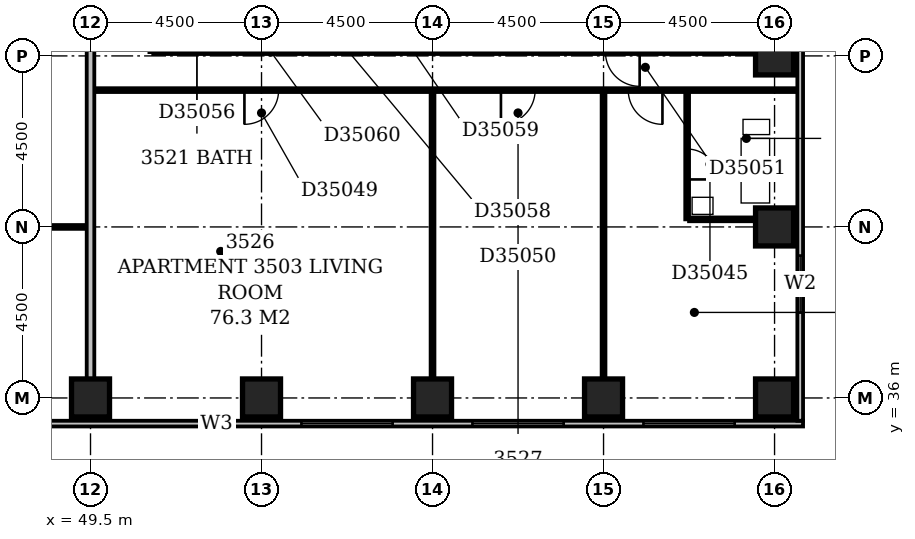
"""IFC4 building model, lengths in metres.
Left out: names, types, materials, properties, quantities, classifications, styles, units other than length and angle.
Written with IfcOpenShell. Run it as: python <this file> out.ifc"""

import sys

from ifc_helpers import new_model, si_unit, direction, frame, frame_2d, origin, origin_2d, place, context, subcontext, project, spatial, rectangle, extrude, element, fill, save


model = new_model("IFC4")
c1 = context("Model", 3, precision=1e-05, world=origin(), true_north=direction((0.0, 1.0)))
c2 = subcontext(c1, "Body", "Model", "MODEL_VIEW")
j1 = project(units=[si_unit("LENGTHUNIT", "METRE"), si_unit("PLANEANGLEUNIT", "RADIAN")], contexts=[c1])
p1 = place(None, origin())
s1 = spatial("IfcSite", under=j1, at=p1, CompositionType="ELEMENT")
p2 = place(p1, origin())
s2 = spatial("IfcBuilding", under=s1, at=p2, CompositionType="ELEMENT")
p3 = place(p2, frame((0.0, 0.0, 141.2)))
s3 = spatial("IfcBuildingStorey", under=s2, at=p3, CompositionType="ELEMENT", Elevation=141.2)
for number, where, z_axis, x_axis in (
    (1, (49.5, 36.0, -0.3), (0.0, 0.0, 1.0), (1.0, 0.0, 0.0)),
    (2, (54.0, 36.0, -0.3), (0.0, 0.0, 1.0), (1.0, 0.0, 0.0)),
    (3, (58.5, 36.0, -0.3), (0.0, 0.0, 1.0), (1.0, 0.0, 0.0)),
    (4, (63.0, 36.0, -0.3), (0.0, 0.0, 1.0), (1.0, 0.0, 0.0)),
    (5, (67.5, 36.0, -0.3), (0.0, 0.0, 1.0), (1.0, 0.0, 0.0)),
    (6, (67.5, 40.5, -0.3), (0.0, 0.0, 1.0), (1.0, 0.0, 0.0)),
    (7, (67.5, 45.0, -0.3), (0.0, 0.0, 1.0), (1.0, 0.0, 0.0)),
):
    element("IfcColumn", number, at=place(p3, frame(where, z_axis=z_axis, x_axis=x_axis)), inside=s3, PredefinedType="COLUMN", context=c2, shape_type="SweptSolid", body=[
        extrude(rectangle(XDim=1.0, YDim=1.0, at=origin_2d()), origin(), (0.0, 0.0, 1.0), 3.6),
    ])
p4 = place(p3, frame((23.1, 35.325, 0.0), z_axis=(0.0, 0.0, 1.0), x_axis=(1.0, 0.0, 0.0)))
e8 = element("IfcWall", 8, at=p4, inside=s3, PredefinedType="STANDARD", context=c2, shape_type="SweptSolid", body=[
    extrude(rectangle(XDim=45.15, YDim=0.15, at=frame_2d((22.575, 0.0))), origin(), (0.0, 0.0, 1.0), 2.7),
])
p5 = place(p4, frame((0.24, 0.0, 0.6)))
e9 = element("IfcOpeningElement", 9, at=p5, cuts=e8, PredefinedType="OPENING", context=c2, shape_type="SweptSolid", body=[
    extrude(rectangle(XDim=0.45, YDim=1.8, at=frame_2d((0.225, 0.9))), frame((0.0, 0.087, 0.0), z_axis=(0.0, -1.0, 0.0), x_axis=(1.0, 0.0, 0.0)), (0.0, 0.0, 1.0), 0.174),
])
p6 = place(p4, frame((2.529, 0.0, 0.6)))
e10 = element("IfcOpeningElement", 10, at=p6, cuts=e8, PredefinedType="OPENING", context=c2, shape_type="SweptSolid", body=[
    extrude(rectangle(XDim=0.6, YDim=1.8, at=frame_2d((0.3, 0.9))), frame((0.0, 0.087, 0.0), z_axis=(0.0, -1.0, 0.0), x_axis=(1.0, 0.0, 0.0)), (0.0, 0.0, 1.0), 0.174),
])
p7 = place(p4, frame((4.95, 0.0, 0.6)))
e11 = element("IfcOpeningElement", 11, at=p7, cuts=e8, PredefinedType="OPENING", context=c2, shape_type="SweptSolid", body=[
    extrude(rectangle(XDim=2.4, YDim=1.8, at=frame_2d((1.2, 0.9))), frame((0.0, 0.087, 0.0), z_axis=(0.0, -1.0, 0.0), x_axis=(1.0, 0.0, 0.0)), (0.0, 0.0, 1.0), 0.174),
])
p8 = place(p4, frame((9.45, 0.0, 0.6)))
e12 = element("IfcOpeningElement", 12, at=p8, cuts=e8, PredefinedType="OPENING", context=c2, shape_type="SweptSolid", body=[
    extrude(rectangle(XDim=2.4, YDim=1.8, at=frame_2d((1.2, 0.9))), frame((0.0, 0.087, 0.0), z_axis=(0.0, -1.0, 0.0), x_axis=(1.0, 0.0, 0.0)), (0.0, 0.0, 1.0), 0.174),
])
p9 = place(p4, frame((13.95, 0.0, 0.6)))
e13 = element("IfcOpeningElement", 13, at=p9, cuts=e8, PredefinedType="OPENING", context=c2, shape_type="SweptSolid", body=[
    extrude(rectangle(XDim=2.4, YDim=1.8, at=frame_2d((1.2, 0.9))), frame((0.0, 0.087, 0.0), z_axis=(0.0, -1.0, 0.0), x_axis=(1.0, 0.0, 0.0)), (0.0, 0.0, 1.0), 0.174),
])
p10 = place(p4, frame((18.45, 0.0, 0.6)))
e14 = element("IfcOpeningElement", 14, at=p10, cuts=e8, PredefinedType="OPENING", context=c2, shape_type="SweptSolid", body=[
    extrude(rectangle(XDim=2.4, YDim=1.8, at=frame_2d((1.2, 0.9))), frame((0.0, 0.087, 0.0), z_axis=(0.0, -1.0, 0.0), x_axis=(1.0, 0.0, 0.0)), (0.0, 0.0, 1.0), 0.174),
])
p11 = place(p4, frame((22.653, 0.0, 0.6)))
e15 = element("IfcOpeningElement", 15, at=p11, cuts=e8, PredefinedType="OPENING", context=c2, shape_type="SweptSolid", body=[
    extrude(rectangle(XDim=1.5, YDim=1.8, at=frame_2d((0.75, 0.9))), frame((0.0, 0.087, 0.0), z_axis=(0.0, -1.0, 0.0), x_axis=(1.0, 0.0, 0.0)), (0.0, 0.0, 1.0), 0.174),
])
p12 = place(p4, frame((29.27, 0.0, 0.6)))
e16 = element("IfcOpeningElement", 16, at=p12, cuts=e8, PredefinedType="OPENING", context=c2, shape_type="SweptSolid", body=[
    extrude(rectangle(XDim=0.9, YDim=1.8, at=frame_2d((0.45, 0.9))), frame((0.0, 0.087, 0.0), z_axis=(0.0, -1.0, 0.0), x_axis=(1.0, 0.0, 0.0)), (0.0, 0.0, 1.0), 0.174),
])
p13 = place(p4, frame((31.95, 0.0, 0.6)))
e17 = element("IfcOpeningElement", 17, at=p13, cuts=e8, PredefinedType="OPENING", context=c2, shape_type="SweptSolid", body=[
    extrude(rectangle(XDim=2.4, YDim=1.8, at=frame_2d((1.2, 0.9))), frame((0.0, 0.087, 0.0), z_axis=(0.0, -1.0, 0.0), x_axis=(1.0, 0.0, 0.0)), (0.0, 0.0, 1.0), 0.174),
])
p14 = place(p4, frame((36.45, 0.0, 0.6)))
e18 = element("IfcOpeningElement", 18, at=p14, cuts=e8, PredefinedType="OPENING", context=c2, shape_type="SweptSolid", body=[
    extrude(rectangle(XDim=2.4, YDim=1.8, at=frame_2d((1.2, 0.9))), frame((0.0, 0.087, 0.0), z_axis=(0.0, -1.0, 0.0), x_axis=(1.0, 0.0, 0.0)), (0.0, 0.0, 1.0), 0.174),
])
p15 = place(p4, frame((40.95, 0.0, 0.6)))
e19 = element("IfcOpeningElement", 19, at=p15, cuts=e8, PredefinedType="OPENING", context=c2, shape_type="SweptSolid", body=[
    extrude(rectangle(XDim=2.4, YDim=1.8, at=frame_2d((1.2, 0.9))), frame((0.0, 0.087, 0.0), z_axis=(0.0, -1.0, 0.0), x_axis=(1.0, 0.0, 0.0)), (0.0, 0.0, 1.0), 0.174),
])
p16 = place(p3, frame((68.175, 35.4, 0.0), z_axis=(0.0, 0.0, 1.0), x_axis=(0.0, 1.0, 0.0)))
e20 = element("IfcWall", 20, at=p16, inside=s3, PredefinedType="STANDARD", context=c2, shape_type="SweptSolid", body=[
    extrude(rectangle(XDim=23.85, YDim=0.15, at=frame_2d((11.925, 0.0))), origin(), (0.0, 0.0, 1.0), 2.7),
])
p17 = place(p16, frame((2.847, 0.0, 0.6)))
e21 = element("IfcOpeningElement", 21, at=p17, cuts=e20, PredefinedType="OPENING", context=c2, shape_type="SweptSolid", body=[
    extrude(rectangle(XDim=1.5, YDim=1.8, at=frame_2d((0.75, 0.9))), frame((0.0, 0.087, 0.0), z_axis=(0.0, -1.0, 0.0), x_axis=(1.0, 0.0, 0.0)), (0.0, 0.0, 1.0), 0.174),
])
p18 = place(p16, frame((10.65, 0.0, 0.6)))
e22 = element("IfcOpeningElement", 22, at=p18, cuts=e20, PredefinedType="OPENING", context=c2, shape_type="SweptSolid", body=[
    extrude(rectangle(XDim=2.4, YDim=1.8, at=frame_2d((1.2, 0.9))), frame((0.0, 0.087, 0.0), z_axis=(0.0, -1.0, 0.0), x_axis=(1.0, 0.0, 0.0)), (0.0, 0.0, 1.0), 0.174),
])
p19 = place(p3, frame((49.5, 36.5, 0.0), z_axis=(0.0, 0.0, 1.0), x_axis=(0.0, 1.0, 0.0)))
e23 = element("IfcWall", 23, at=p19, inside=s3, PredefinedType="PARTITIONING", context=c2, shape_type="SweptSolid", body=[
    extrude(rectangle(XDim=12.9, YDim=0.2, at=frame_2d((6.45, 0.0))), origin(), (0.0, 0.0, 1.0), 3.3),
])
p20 = place(p3, frame((58.5, 36.5, 0.0), z_axis=(0.0, 0.0, 1.0), x_axis=(0.0, 1.0, 0.0)))
e24 = element("IfcWall", 24, at=p20, inside=s3, PredefinedType="PARTITIONING", context=c2, shape_type="SweptSolid", body=[
    extrude(rectangle(XDim=7.55, YDim=0.1, at=frame_2d((3.775, 0.0))), origin(), (0.0, 0.0, 1.0), 3.3),
])
p21 = place(p3, frame((63.0, 36.5, 0.0), z_axis=(0.0, 0.0, 1.0), x_axis=(0.0, 1.0, 0.0)))
e25 = element("IfcWall", 25, at=p21, inside=s3, PredefinedType="PARTITIONING", context=c2, shape_type="SweptSolid", body=[
    extrude(rectangle(XDim=7.55, YDim=0.1, at=frame_2d((3.775, 0.0))), origin(), (0.0, 0.0, 1.0), 2.4),
])
p22 = place(p3, frame((45.1, 40.5, 0.0), z_axis=(0.0, 0.0, 1.0), x_axis=(1.0, 0.0, 0.0)))
e26 = element("IfcWall", 26, at=p22, inside=s3, PredefinedType="PARTITIONING", context=c2, shape_type="SweptSolid", body=[
    extrude(rectangle(XDim=4.3, YDim=0.1, at=frame_2d((2.15, 0.0))), origin(), (0.0, 0.0, 1.0), 3.3),
])
p23 = place(p22, frame((1.7, 0.0, 0.0)))
e27 = element("IfcOpeningElement", 27, at=p23, cuts=e26, PredefinedType="OPENING", context=c2, shape_type="SweptSolid", body=[
    extrude(rectangle(XDim=0.9, YDim=2.1, at=frame_2d((0.45, 1.05))), frame((0.0, 0.062, 0.0), z_axis=(0.0, -1.0, 0.0), x_axis=(1.0, 0.0, 0.0)), (0.0, 0.0, 1.0), 0.124),
])
p24 = place(p3, frame((65.2, 40.7, 0.0), z_axis=(0.0, 0.0, 1.0), x_axis=(0.0, 1.0, 0.0)))
e28 = element("IfcWall", 28, at=p24, inside=s3, PredefinedType="PLUMBINGWALL", context=c2, shape_type="SweptSolid", body=[
    extrude(rectangle(XDim=3.35, YDim=0.1, at=frame_2d((1.675, 0.0))), origin(), (0.0, 0.0, 1.0), 3.3),
])
p25 = place(p24, frame((1.05, 0.0, 0.0)))
e29 = element("IfcOpeningElement", 29, at=p25, cuts=e28, PredefinedType="OPENING", context=c2, shape_type="SweptSolid", body=[
    extrude(rectangle(XDim=0.8, YDim=2.1, at=frame_2d((0.4, 1.05))), frame((0.0, 0.062, 0.0), z_axis=(0.0, -1.0, 0.0), x_axis=(1.0, 0.0, 0.0)), (0.0, 0.0, 1.0), 0.124),
])
p26 = place(p3, frame((65.25, 40.7, 0.0), z_axis=(0.0, 0.0, 1.0), x_axis=(1.0, 0.0, 0.0)))
e30 = element("IfcWall", 30, at=p26, inside=s3, PredefinedType="PLUMBINGWALL", context=c2, shape_type="SweptSolid", body=[
    extrude(rectangle(XDim=1.75, YDim=0.1, at=frame_2d((0.875, 0.0))), origin(), (0.0, 0.0, 1.0), 3.3),
])
p27 = place(p3, frame((49.6, 44.1, 0.0), z_axis=(0.0, 0.0, 1.0), x_axis=(1.0, 0.0, 0.0)))
e31 = element("IfcWall", 31, at=p27, inside=s3, PredefinedType="PARTITIONING", context=c2, shape_type="SweptSolid", body=[
    extrude(rectangle(XDim=18.5, YDim=0.1, at=frame_2d((9.25, 0.0))), origin(), (0.0, 0.0, 1.0), 3.3),
])
p28 = place(p27, frame((3.95, 0.0, 0.0)))
e32 = element("IfcOpeningElement", 32, at=p28, cuts=e31, PredefinedType="OPENING", context=c2, shape_type="SweptSolid", body=[
    extrude(rectangle(XDim=0.9, YDim=2.1, at=frame_2d((0.45, 1.05))), frame((0.0, 0.062, 0.0), z_axis=(0.0, -1.0, 0.0), x_axis=(1.0, 0.0, 0.0)), (0.0, 0.0, 1.0), 0.124),
])
p29 = place(p27, frame((10.7, 0.0, 0.0)))
e33 = element("IfcOpeningElement", 33, at=p29, cuts=e31, PredefinedType="OPENING", context=c2, shape_type="SweptSolid", body=[
    extrude(rectangle(XDim=0.9, YDim=2.1, at=frame_2d((0.45, 1.05))), frame((0.0, 0.062, 0.0), z_axis=(0.0, -1.0, 0.0), x_axis=(1.0, 0.0, 0.0)), (0.0, 0.0, 1.0), 0.124),
])
p30 = place(p27, frame((14.05, 0.0, 0.0)))
e34 = element("IfcOpeningElement", 34, at=p30, cuts=e31, PredefinedType="OPENING", context=c2, shape_type="SweptSolid", body=[
    extrude(rectangle(XDim=0.9, YDim=2.1, at=frame_2d((0.45, 1.05))), frame((0.0, 0.062, 0.0), z_axis=(0.0, -1.0, 0.0), x_axis=(1.0, 0.0, 0.0)), (0.0, 0.0, 1.0), 0.124),
])
p31 = place(p3, frame((51.15, 45.1, 0.0), z_axis=(0.0, 0.0, 1.0), x_axis=(1.0, 0.0, 0.0)))
e35 = element("IfcWall", 35, at=p31, inside=s3, PredefinedType="PARTITIONING", context=c2, shape_type="SweptSolid", body=[
    extrude(rectangle(XDim=15.85, YDim=0.1, at=frame_2d((7.925, 0.0))), origin(), (0.0, 0.0, 1.0), 3.3),
])
p32 = place(p31, frame((0.75, 0.0, 0.0)))
e36 = element("IfcOpeningElement", 36, at=p32, cuts=e35, PredefinedType="OPENING", context=c2, shape_type="SweptSolid", body=[
    extrude(rectangle(XDim=0.8, YDim=2.1, at=frame_2d((0.4, 1.05))), frame((0.0, 0.062, 0.0), z_axis=(0.0, -1.0, 0.0), x_axis=(1.0, 0.0, 0.0)), (0.0, 0.0, 1.0), 0.124),
])
p33 = place(p31, frame((11.9, 0.0, 0.0)))
e37 = element("IfcOpeningElement", 37, at=p33, cuts=e35, PredefinedType="OPENING", context=c2, shape_type="SweptSolid", body=[
    extrude(rectangle(XDim=0.9, YDim=2.1, at=frame_2d((0.45, 1.05))), frame((0.0, 0.062, 0.0), z_axis=(0.0, -1.0, 0.0), x_axis=(1.0, 0.0, 0.0)), (0.0, 0.0, 1.0), 0.124),
])
p34 = place(p31, frame((4.25, 0.0, 0.0)))
e38 = element("IfcOpeningElement", 38, at=p34, cuts=e35, PredefinedType="OPENING", context=c2, shape_type="SweptSolid", body=[
    extrude(rectangle(XDim=0.8, YDim=2.1, at=frame_2d((0.4, 1.05))), frame((0.0, 0.062, 0.0), z_axis=(0.0, -1.0, 0.0), x_axis=(1.0, 0.0, 0.0)), (0.0, 0.0, 1.0), 0.124),
])
p35 = place(p31, frame((6.05, 0.0, 0.0)))
e39 = element("IfcOpeningElement", 39, at=p35, cuts=e35, PredefinedType="OPENING", context=c2, shape_type="SweptSolid", body=[
    extrude(rectangle(XDim=0.8, YDim=2.1, at=frame_2d((0.4, 1.05))), frame((0.0, 0.062, 0.0), z_axis=(0.0, -1.0, 0.0), x_axis=(1.0, 0.0, 0.0)), (0.0, 0.0, 1.0), 0.124),
])
p36 = place(p31, frame((2.7, 0.0, 0.0)))
e40 = element("IfcOpeningElement", 40, at=p36, cuts=e35, PredefinedType="OPENING", context=c2, shape_type="SweptSolid", body=[
    extrude(rectangle(XDim=0.8, YDim=2.1, at=frame_2d((0.4, 1.05))), frame((0.0, 0.062, 0.0), z_axis=(0.0, -1.0, 0.0), x_axis=(1.0, 0.0, 0.0)), (0.0, 0.0, 1.0), 0.124),
])
p37 = place(p12, origin())
e41 = element("IfcWindow", 41, at=p37, inside=s3, PartitioningType="SINGLE_PANEL", PredefinedType="WINDOW", context=c2, shape_type="SweptSolid", body=[
    extrude(rectangle(XDim=0.9, YDim=1.8, at=frame_2d((0.45, 0.9))), frame((0.0, 0.03, 0.0), z_axis=(0.0, -1.0, 0.0), x_axis=(1.0, 0.0, 0.0)), (0.0, 0.0, 1.0), 0.06),
])
fill(e16, e41)
p38 = place(p13, origin())
e42 = element("IfcWindow", 42, at=p38, inside=s3, PartitioningType="SINGLE_PANEL", PredefinedType="WINDOW", context=c2, shape_type="SweptSolid", body=[
    extrude(rectangle(XDim=2.4, YDim=1.8, at=frame_2d((1.2, 0.9))), frame((0.0, 0.03, 0.0), z_axis=(0.0, -1.0, 0.0), x_axis=(1.0, 0.0, 0.0)), (0.0, 0.0, 1.0), 0.06),
])
fill(e17, e42)
p39 = place(p14, origin())
e43 = element("IfcWindow", 43, at=p39, inside=s3, PartitioningType="SINGLE_PANEL", PredefinedType="WINDOW", context=c2, shape_type="SweptSolid", body=[
    extrude(rectangle(XDim=2.4, YDim=1.8, at=frame_2d((1.2, 0.9))), frame((0.0, 0.03, 0.0), z_axis=(0.0, -1.0, 0.0), x_axis=(1.0, 0.0, 0.0)), (0.0, 0.0, 1.0), 0.06),
])
fill(e18, e43)
p40 = place(p15, origin())
e44 = element("IfcWindow", 44, at=p40, inside=s3, PartitioningType="SINGLE_PANEL", PredefinedType="WINDOW", context=c2, shape_type="SweptSolid", body=[
    extrude(rectangle(XDim=2.4, YDim=1.8, at=frame_2d((1.2, 0.9))), frame((0.0, 0.03, 0.0), z_axis=(0.0, -1.0, 0.0), x_axis=(1.0, 0.0, 0.0)), (0.0, 0.0, 1.0), 0.06),
])
fill(e19, e44)
p41 = place(p17, origin())
e45 = element("IfcWindow", 45, at=p41, inside=s3, PartitioningType="SINGLE_PANEL", PredefinedType="WINDOW", context=c2, shape_type="SweptSolid", body=[
    extrude(rectangle(XDim=1.5, YDim=1.8, at=frame_2d((0.75, 0.9))), frame((0.0, 0.03, 0.0), z_axis=(0.0, -1.0, 0.0), x_axis=(1.0, 0.0, 0.0)), (0.0, 0.0, 1.0), 0.06),
])
fill(e21, e45)
p42 = place(p25, frame((0.8, 0.0, 0.0), z_axis=(0.0, 0.0, 1.0), x_axis=(-1.0, 0.0, 0.0)))
e46 = element("IfcDoor", 46, at=p42, inside=s3, OperationType="SINGLE_SWING_RIGHT", PredefinedType="DOOR", context=c2, shape_type="SweptSolid", body=[
    extrude(rectangle(XDim=0.8, YDim=2.1, at=frame_2d((0.4, 1.05))), frame((0.0, 0.025, 0.0), z_axis=(0.0, -1.0, 0.0), x_axis=(1.0, 0.0, 0.0)), (0.0, 0.0, 1.0), 0.05),
])
fill(e29, e46)
p43 = place(p28, frame((0.9, 0.0, 0.0), z_axis=(0.0, 0.0, 1.0), x_axis=(-1.0, 0.0, 0.0)))
e47 = element("IfcDoor", 47, at=p43, inside=s3, OperationType="SINGLE_SWING_RIGHT", PredefinedType="DOOR", context=c2, shape_type="SweptSolid", body=[
    extrude(rectangle(XDim=0.9, YDim=2.1, at=frame_2d((0.45, 1.05))), frame((0.0, 0.025, 0.0), z_axis=(0.0, -1.0, 0.0), x_axis=(1.0, 0.0, 0.0)), (0.0, 0.0, 1.0), 0.05),
])
fill(e32, e47)
p44 = place(p29, frame((0.9, 0.0, 0.0), z_axis=(0.0, 0.0, 1.0), x_axis=(-1.0, 0.0, 0.0)))
e48 = element("IfcDoor", 48, at=p44, inside=s3, OperationType="SINGLE_SWING_RIGHT", PredefinedType="DOOR", context=c2, shape_type="SweptSolid", body=[
    extrude(rectangle(XDim=0.9, YDim=2.1, at=frame_2d((0.45, 1.05))), frame((0.0, 0.025, 0.0), z_axis=(0.0, -1.0, 0.0), x_axis=(1.0, 0.0, 0.0)), (0.0, 0.0, 1.0), 0.05),
])
fill(e33, e48)
p45 = place(p30, origin())
e49 = element("IfcDoor", 49, at=p45, inside=s3, OperationType="SINGLE_SWING_RIGHT", PredefinedType="DOOR", context=c2, shape_type="SweptSolid", body=[
    extrude(rectangle(XDim=0.9, YDim=2.1, at=frame_2d((0.45, 1.05))), frame((0.0, 0.025, 0.0), z_axis=(0.0, -1.0, 0.0), x_axis=(1.0, 0.0, 0.0)), (0.0, 0.0, 1.0), 0.05),
])
fill(e34, e49)
p46 = place(p32, origin())
e50 = element("IfcDoor", 50, at=p46, inside=s3, OperationType="SINGLE_SWING_LEFT", PredefinedType="DOOR", context=c2, shape_type="SweptSolid", body=[
    extrude(rectangle(XDim=0.8, YDim=2.1, at=frame_2d((0.4, 1.05))), frame((0.0, 0.025, 0.0), z_axis=(0.0, -1.0, 0.0), x_axis=(1.0, 0.0, 0.0)), (0.0, 0.0, 1.0), 0.05),
])
fill(e36, e50)
p47 = place(p33, origin())
e51 = element("IfcDoor", 51, at=p47, inside=s3, OperationType="SINGLE_SWING_RIGHT", PredefinedType="DOOR", context=c2, shape_type="SweptSolid", body=[
    extrude(rectangle(XDim=0.9, YDim=2.1, at=frame_2d((0.45, 1.05))), frame((0.0, 0.025, 0.0), z_axis=(0.0, -1.0, 0.0), x_axis=(1.0, 0.0, 0.0)), (0.0, 0.0, 1.0), 0.05),
])
fill(e37, e51)
p48 = place(p34, origin())
e52 = element("IfcDoor", 52, at=p48, inside=s3, OperationType="SINGLE_SWING_LEFT", PredefinedType="DOOR", context=c2, shape_type="SweptSolid", body=[
    extrude(rectangle(XDim=0.8, YDim=2.1, at=frame_2d((0.4, 1.05))), frame((0.0, 0.025, 0.0), z_axis=(0.0, -1.0, 0.0), x_axis=(1.0, 0.0, 0.0)), (0.0, 0.0, 1.0), 0.05),
])
fill(e38, e52)
p49 = place(p35, origin())
e53 = element("IfcDoor", 53, at=p49, inside=s3, OperationType="SINGLE_SWING_LEFT", PredefinedType="DOOR", context=c2, shape_type="SweptSolid", body=[
    extrude(rectangle(XDim=0.8, YDim=2.1, at=frame_2d((0.4, 1.05))), frame((0.0, 0.025, 0.0), z_axis=(0.0, -1.0, 0.0), x_axis=(1.0, 0.0, 0.0)), (0.0, 0.0, 1.0), 0.05),
])
fill(e39, e53)
p50 = place(p36, origin())
e54 = element("IfcDoor", 54, at=p50, inside=s3, OperationType="SINGLE_SWING_LEFT", PredefinedType="DOOR", context=c2, shape_type="SweptSolid", body=[
    extrude(rectangle(XDim=0.8, YDim=2.1, at=frame_2d((0.4, 1.05))), frame((0.0, 0.025, 0.0), z_axis=(0.0, -1.0, 0.0), x_axis=(1.0, 0.0, 0.0)), (0.0, 0.0, 1.0), 0.05),
])
fill(e40, e54)
save(model, sys.argv[1])
